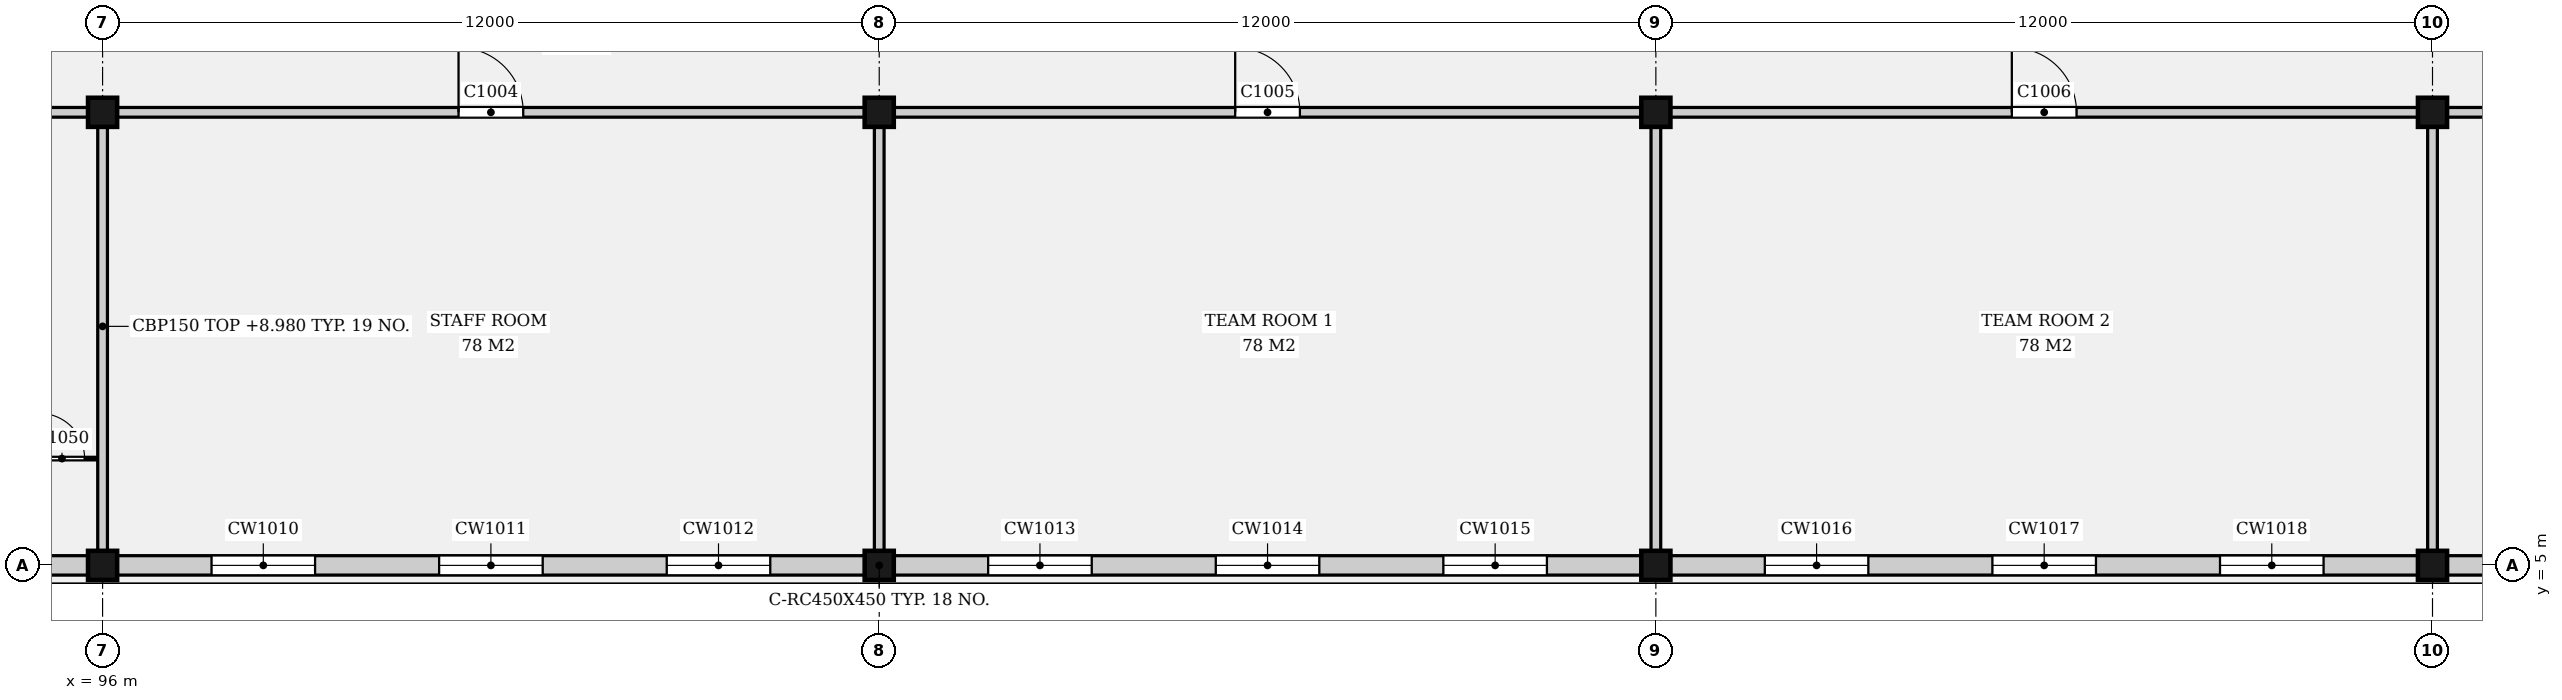
"""IFC4 building model, lengths in metres.
Left out: names, types, materials, properties, quantities, classifications, styles, units other than length and angle.
Written with IfcOpenShell. Run it as: python <this file> out.ifc"""

import sys

from ifc_helpers import new_model, si_unit, direction, frame, frame_2d, origin, origin_2d, place, context, subcontext, project, spatial, rectangle, extrude, element, fill, save


model = new_model("IFC4")
c1 = context("Model", 3, precision=1e-05, world=origin(), true_north=direction((0.0, 1.0)))
c2 = subcontext(c1, "Body", "Model", "MODEL_VIEW")
j1 = project(units=[si_unit("LENGTHUNIT", "METRE"), si_unit("PLANEANGLEUNIT", "RADIAN")], contexts=[c1])
p1 = place(None, origin())
s1 = spatial("IfcSite", under=j1, at=p1, CompositionType="ELEMENT")
p2 = place(p1, origin())
s2 = spatial("IfcBuilding", under=s1, at=p2, CompositionType="ELEMENT")
p3 = place(p2, frame((0.0, 0.0, 5.0)))
s3 = spatial("IfcBuildingStorey", under=s2, at=p3, CompositionType="ELEMENT", Elevation=5.0)
for number, where, z_axis, x_axis in (
    (1, (96.0, 5.0, 0.0), (0.0, 0.0, 1.0), (1.0, 0.0, 0.0)),
    (2, (96.0, 12.0, 0.0), (0.0, 0.0, 1.0), (1.0, 0.0, 0.0)),
    (3, (108.0, 5.0, 0.0), (0.0, 0.0, 1.0), (1.0, 0.0, 0.0)),
    (4, (108.0, 12.0, 0.0), (0.0, 0.0, 1.0), (1.0, 0.0, 0.0)),
    (5, (120.0, 5.0, 0.0), (0.0, 0.0, 1.0), (1.0, 0.0, 0.0)),
    (6, (120.0, 12.0, 0.0), (0.0, 0.0, 1.0), (1.0, 0.0, 0.0)),
    (7, (132.0, 5.0, 0.0), (0.0, 0.0, 1.0), (1.0, 0.0, 0.0)),
    (8, (132.0, 12.0, 0.0), (0.0, 0.0, 1.0), (1.0, 0.0, 0.0)),
):
    element("IfcColumn", number, at=place(p3, frame(where, z_axis=z_axis, x_axis=x_axis)), inside=s3, PredefinedType="COLUMN", context=c2, shape_type="SweptSolid", body=[
        extrude(rectangle(XDim=0.45, YDim=0.45, at=origin_2d()), origin(), (0.0, 0.0, 1.0), 4.4),
    ])
p4 = place(p3, frame((84.225, 5.0, 0.0), z_axis=(0.0, 0.0, 1.0), x_axis=(1.0, 0.0, 0.0)))
e9 = element("IfcWall", 9, at=p4, inside=s3, PredefinedType="ELEMENTEDWALL", context=c2, shape_type="SweptSolid", body=[
    extrude(rectangle(XDim=11.55, YDim=0.3, at=frame_2d((5.775, 0.0))), origin(), (0.0, 0.0, 1.0), 3.98),
])
p5 = place(p4, frame((1.458, 0.0, 1.4)))
e10 = element("IfcOpeningElement", 10, at=p5, cuts=e9, PredefinedType="OPENING", context=c2, shape_type="SweptSolid", body=[
    extrude(rectangle(XDim=1.6, YDim=1.2, at=frame_2d((0.8, 0.6))), frame((0.0, 0.16, 0.0), z_axis=(0.0, -1.0, 0.0), x_axis=(1.0, 0.0, 0.0)), (0.0, 0.0, 1.0), 0.32),
])
p6 = place(p4, frame((4.975, 0.0, 1.4)))
e11 = element("IfcOpeningElement", 11, at=p6, cuts=e9, PredefinedType="OPENING", context=c2, shape_type="SweptSolid", body=[
    extrude(rectangle(XDim=1.6, YDim=1.2, at=frame_2d((0.8, 0.6))), frame((0.0, 0.16, 0.0), z_axis=(0.0, -1.0, 0.0), x_axis=(1.0, 0.0, 0.0)), (0.0, 0.0, 1.0), 0.32),
])
p7 = place(p4, frame((8.492, 0.0, 1.4)))
e12 = element("IfcOpeningElement", 12, at=p7, cuts=e9, PredefinedType="OPENING", context=c2, shape_type="SweptSolid", body=[
    extrude(rectangle(XDim=1.6, YDim=1.2, at=frame_2d((0.8, 0.6))), frame((0.0, 0.16, 0.0), z_axis=(0.0, -1.0, 0.0), x_axis=(1.0, 0.0, 0.0)), (0.0, 0.0, 1.0), 0.32),
])
p8 = place(p3, frame((96.225, 5.0, 0.0), z_axis=(0.0, 0.0, 1.0), x_axis=(1.0, 0.0, 0.0)))
e13 = element("IfcWall", 13, at=p8, inside=s3, PredefinedType="ELEMENTEDWALL", context=c2, shape_type="SweptSolid", body=[
    extrude(rectangle(XDim=11.55, YDim=0.3, at=frame_2d((5.775, 0.0))), origin(), (0.0, 0.0, 1.0), 3.98),
])
p9 = place(p8, frame((1.458, 0.0, 1.4)))
e14 = element("IfcOpeningElement", 14, at=p9, cuts=e13, PredefinedType="OPENING", context=c2, shape_type="SweptSolid", body=[
    extrude(rectangle(XDim=1.6, YDim=1.2, at=frame_2d((0.8, 0.6))), frame((0.0, 0.16, 0.0), z_axis=(0.0, -1.0, 0.0), x_axis=(1.0, 0.0, 0.0)), (0.0, 0.0, 1.0), 0.32),
])
p10 = place(p8, frame((4.975, 0.0, 1.4)))
e15 = element("IfcOpeningElement", 15, at=p10, cuts=e13, PredefinedType="OPENING", context=c2, shape_type="SweptSolid", body=[
    extrude(rectangle(XDim=1.6, YDim=1.2, at=frame_2d((0.8, 0.6))), frame((0.0, 0.16, 0.0), z_axis=(0.0, -1.0, 0.0), x_axis=(1.0, 0.0, 0.0)), (0.0, 0.0, 1.0), 0.32),
])
p11 = place(p8, frame((8.492, 0.0, 1.4)))
e16 = element("IfcOpeningElement", 16, at=p11, cuts=e13, PredefinedType="OPENING", context=c2, shape_type="SweptSolid", body=[
    extrude(rectangle(XDim=1.6, YDim=1.2, at=frame_2d((0.8, 0.6))), frame((0.0, 0.16, 0.0), z_axis=(0.0, -1.0, 0.0), x_axis=(1.0, 0.0, 0.0)), (0.0, 0.0, 1.0), 0.32),
])
p12 = place(p3, frame((108.225, 5.0, 0.0), z_axis=(0.0, 0.0, 1.0), x_axis=(1.0, 0.0, 0.0)))
e17 = element("IfcWall", 17, at=p12, inside=s3, PredefinedType="ELEMENTEDWALL", context=c2, shape_type="SweptSolid", body=[
    extrude(rectangle(XDim=11.55, YDim=0.3, at=frame_2d((5.775, 0.0))), origin(), (0.0, 0.0, 1.0), 3.98),
])
p13 = place(p12, frame((1.458, 0.0, 1.4)))
e18 = element("IfcOpeningElement", 18, at=p13, cuts=e17, PredefinedType="OPENING", context=c2, shape_type="SweptSolid", body=[
    extrude(rectangle(XDim=1.6, YDim=1.2, at=frame_2d((0.8, 0.6))), frame((0.0, 0.16, 0.0), z_axis=(0.0, -1.0, 0.0), x_axis=(1.0, 0.0, 0.0)), (0.0, 0.0, 1.0), 0.32),
])
p14 = place(p12, frame((4.975, 0.0, 1.4)))
e19 = element("IfcOpeningElement", 19, at=p14, cuts=e17, PredefinedType="OPENING", context=c2, shape_type="SweptSolid", body=[
    extrude(rectangle(XDim=1.6, YDim=1.2, at=frame_2d((0.8, 0.6))), frame((0.0, 0.16, 0.0), z_axis=(0.0, -1.0, 0.0), x_axis=(1.0, 0.0, 0.0)), (0.0, 0.0, 1.0), 0.32),
])
p15 = place(p12, frame((8.492, 0.0, 1.4)))
e20 = element("IfcOpeningElement", 20, at=p15, cuts=e17, PredefinedType="OPENING", context=c2, shape_type="SweptSolid", body=[
    extrude(rectangle(XDim=1.6, YDim=1.2, at=frame_2d((0.8, 0.6))), frame((0.0, 0.16, 0.0), z_axis=(0.0, -1.0, 0.0), x_axis=(1.0, 0.0, 0.0)), (0.0, 0.0, 1.0), 0.32),
])
p16 = place(p3, frame((120.225, 5.0, 0.0), z_axis=(0.0, 0.0, 1.0), x_axis=(1.0, 0.0, 0.0)))
e21 = element("IfcWall", 21, at=p16, inside=s3, PredefinedType="ELEMENTEDWALL", context=c2, shape_type="SweptSolid", body=[
    extrude(rectangle(XDim=11.55, YDim=0.3, at=frame_2d((5.775, 0.0))), origin(), (0.0, 0.0, 1.0), 3.98),
])
p17 = place(p16, frame((1.458, 0.0, 1.4)))
e22 = element("IfcOpeningElement", 22, at=p17, cuts=e21, PredefinedType="OPENING", context=c2, shape_type="SweptSolid", body=[
    extrude(rectangle(XDim=1.6, YDim=1.2, at=frame_2d((0.8, 0.6))), frame((0.0, 0.16, 0.0), z_axis=(0.0, -1.0, 0.0), x_axis=(1.0, 0.0, 0.0)), (0.0, 0.0, 1.0), 0.32),
])
p18 = place(p16, frame((4.975, 0.0, 1.4)))
e23 = element("IfcOpeningElement", 23, at=p18, cuts=e21, PredefinedType="OPENING", context=c2, shape_type="SweptSolid", body=[
    extrude(rectangle(XDim=1.6, YDim=1.2, at=frame_2d((0.8, 0.6))), frame((0.0, 0.16, 0.0), z_axis=(0.0, -1.0, 0.0), x_axis=(1.0, 0.0, 0.0)), (0.0, 0.0, 1.0), 0.32),
])
p19 = place(p16, frame((8.492, 0.0, 1.4)))
e24 = element("IfcOpeningElement", 24, at=p19, cuts=e21, PredefinedType="OPENING", context=c2, shape_type="SweptSolid", body=[
    extrude(rectangle(XDim=1.6, YDim=1.2, at=frame_2d((0.8, 0.6))), frame((0.0, 0.16, 0.0), z_axis=(0.0, -1.0, 0.0), x_axis=(1.0, 0.0, 0.0)), (0.0, 0.0, 1.0), 0.32),
])
p20 = place(p3, frame((132.225, 5.0, 0.0), z_axis=(0.0, 0.0, 1.0), x_axis=(1.0, 0.0, 0.0)))
e25 = element("IfcWall", 25, at=p20, inside=s3, PredefinedType="ELEMENTEDWALL", context=c2, shape_type="SweptSolid", body=[
    extrude(rectangle(XDim=11.55, YDim=0.3, at=frame_2d((5.775, 0.0))), origin(), (0.0, 0.0, 1.0), 3.98),
])
p21 = place(p20, frame((1.458, 0.0, 1.4)))
e26 = element("IfcOpeningElement", 26, at=p21, cuts=e25, PredefinedType="OPENING", context=c2, shape_type="SweptSolid", body=[
    extrude(rectangle(XDim=1.6, YDim=1.2, at=frame_2d((0.8, 0.6))), frame((0.0, 0.16, 0.0), z_axis=(0.0, -1.0, 0.0), x_axis=(1.0, 0.0, 0.0)), (0.0, 0.0, 1.0), 0.32),
])
p22 = place(p20, frame((4.975, 0.0, 1.4)))
e27 = element("IfcOpeningElement", 27, at=p22, cuts=e25, PredefinedType="OPENING", context=c2, shape_type="SweptSolid", body=[
    extrude(rectangle(XDim=1.6, YDim=1.2, at=frame_2d((0.8, 0.6))), frame((0.0, 0.16, 0.0), z_axis=(0.0, -1.0, 0.0), x_axis=(1.0, 0.0, 0.0)), (0.0, 0.0, 1.0), 0.32),
])
p23 = place(p20, frame((8.492, 0.0, 1.4)))
e28 = element("IfcOpeningElement", 28, at=p23, cuts=e25, PredefinedType="OPENING", context=c2, shape_type="SweptSolid", body=[
    extrude(rectangle(XDim=1.6, YDim=1.2, at=frame_2d((0.8, 0.6))), frame((0.0, 0.16, 0.0), z_axis=(0.0, -1.0, 0.0), x_axis=(1.0, 0.0, 0.0)), (0.0, 0.0, 1.0), 0.32),
])
p24 = place(p3, frame((84.225, 12.0, 0.0), z_axis=(0.0, 0.0, 1.0), x_axis=(1.0, 0.0, 0.0)))
e29 = element("IfcWall", 29, at=p24, inside=s3, PredefinedType="PARTITIONING", context=c2, shape_type="SweptSolid", body=[
    extrude(rectangle(XDim=11.55, YDim=0.15, at=frame_2d((5.775, 0.0))), origin(), (0.0, 0.0, 1.0), 3.98),
])
p25 = place(p24, frame((4.875, 0.0, 0.0)))
e30 = element("IfcOpeningElement", 30, at=p25, cuts=e29, PredefinedType="OPENING", context=c2, shape_type="SweptSolid", body=[
    extrude(rectangle(XDim=1.8, YDim=2.4, at=frame_2d((0.9, 1.2))), frame((0.0, 0.085, 0.0), z_axis=(0.0, -1.0, 0.0), x_axis=(1.0, 0.0, 0.0)), (0.0, 0.0, 1.0), 0.17),
])
p26 = place(p3, frame((96.225, 12.0, 0.0), z_axis=(0.0, 0.0, 1.0), x_axis=(1.0, 0.0, 0.0)))
e31 = element("IfcWall", 31, at=p26, inside=s3, PredefinedType="PARTITIONING", context=c2, shape_type="SweptSolid", body=[
    extrude(rectangle(XDim=11.55, YDim=0.15, at=frame_2d((5.775, 0.0))), origin(), (0.0, 0.0, 1.0), 3.98),
])
p27 = place(p26, frame((5.275, 0.0, 0.0)))
e32 = element("IfcOpeningElement", 32, at=p27, cuts=e31, PredefinedType="OPENING", context=c2, shape_type="SweptSolid", body=[
    extrude(rectangle(XDim=1.0, YDim=2.1, at=frame_2d((0.5, 1.05))), frame((0.0, 0.085, 0.0), z_axis=(0.0, -1.0, 0.0), x_axis=(1.0, 0.0, 0.0)), (0.0, 0.0, 1.0), 0.17),
])
p28 = place(p3, frame((108.225, 12.0, 0.0), z_axis=(0.0, 0.0, 1.0), x_axis=(1.0, 0.0, 0.0)))
e33 = element("IfcWall", 33, at=p28, inside=s3, PredefinedType="PARTITIONING", context=c2, shape_type="SweptSolid", body=[
    extrude(rectangle(XDim=11.55, YDim=0.15, at=frame_2d((5.775, 0.0))), origin(), (0.0, 0.0, 1.0), 3.98),
])
p29 = place(p28, frame((5.275, 0.0, 0.0)))
e34 = element("IfcOpeningElement", 34, at=p29, cuts=e33, PredefinedType="OPENING", context=c2, shape_type="SweptSolid", body=[
    extrude(rectangle(XDim=1.0, YDim=2.1, at=frame_2d((0.5, 1.05))), frame((0.0, 0.085, 0.0), z_axis=(0.0, -1.0, 0.0), x_axis=(1.0, 0.0, 0.0)), (0.0, 0.0, 1.0), 0.17),
])
p30 = place(p3, frame((120.225, 12.0, 0.0), z_axis=(0.0, 0.0, 1.0), x_axis=(1.0, 0.0, 0.0)))
e35 = element("IfcWall", 35, at=p30, inside=s3, PredefinedType="PARTITIONING", context=c2, shape_type="SweptSolid", body=[
    extrude(rectangle(XDim=11.55, YDim=0.15, at=frame_2d((5.775, 0.0))), origin(), (0.0, 0.0, 1.0), 3.98),
])
p31 = place(p30, frame((5.275, 0.0, 0.0)))
e36 = element("IfcOpeningElement", 36, at=p31, cuts=e35, PredefinedType="OPENING", context=c2, shape_type="SweptSolid", body=[
    extrude(rectangle(XDim=1.0, YDim=2.1, at=frame_2d((0.5, 1.05))), frame((0.0, 0.085, 0.0), z_axis=(0.0, -1.0, 0.0), x_axis=(1.0, 0.0, 0.0)), (0.0, 0.0, 1.0), 0.17),
])
p32 = place(p3, frame((132.225, 12.0, 0.0), z_axis=(0.0, 0.0, 1.0), x_axis=(1.0, 0.0, 0.0)))
e37 = element("IfcWall", 37, at=p32, inside=s3, PredefinedType="PARTITIONING", context=c2, shape_type="SweptSolid", body=[
    extrude(rectangle(XDim=11.55, YDim=0.15, at=frame_2d((5.775, 0.0))), origin(), (0.0, 0.0, 1.0), 3.98),
])
p33 = place(p32, frame((5.275, 0.0, 0.0)))
e38 = element("IfcOpeningElement", 38, at=p33, cuts=e37, PredefinedType="OPENING", context=c2, shape_type="SweptSolid", body=[
    extrude(rectangle(XDim=1.0, YDim=2.1, at=frame_2d((0.5, 1.05))), frame((0.0, 0.085, 0.0), z_axis=(0.0, -1.0, 0.0), x_axis=(1.0, 0.0, 0.0)), (0.0, 0.0, 1.0), 0.17),
])
for number, where, z_axis, x_axis in (
    (39, (96.0, 5.225, 0.0), (0.0, 0.0, 1.0), (0.0, 1.0, 0.0)),
    (40, (108.0, 5.225, 0.0), (0.0, 0.0, 1.0), (0.0, 1.0, 0.0)),
    (41, (120.0, 5.225, 0.0), (0.0, 0.0, 1.0), (0.0, 1.0, 0.0)),
    (42, (132.0, 5.225, 0.0), (0.0, 0.0, 1.0), (0.0, 1.0, 0.0)),
):
    element("IfcWall", number, at=place(p3, frame(where, z_axis=z_axis, x_axis=x_axis)), inside=s3, PredefinedType="PARTITIONING", context=c2, shape_type="SweptSolid", body=[
        extrude(rectangle(XDim=6.55, YDim=0.15, at=frame_2d((3.275, 0.0))), origin(), (0.0, 0.0, 1.0), 3.98),
    ])
p34 = place(p3, frame((94.82, 6.65, 0.0), z_axis=(0.0, 0.0, 1.0), x_axis=(1.0, 0.0, 0.0)))
e43 = element("IfcWall", 43, at=p34, inside=s3, PredefinedType="PARTITIONING", context=c2, shape_type="SweptSolid", body=[
    extrude(rectangle(XDim=1.105, YDim=0.04, at=frame_2d((0.552, 0.0))), origin(), (0.0, 0.0, 1.0), 2.4),
])
p35 = place(p34, frame((0.202, 0.0, 0.0)))
e44 = element("IfcOpeningElement", 44, at=p35, cuts=e43, PredefinedType="OPENING", context=c2, shape_type="SweptSolid", body=[
    extrude(rectangle(XDim=0.7, YDim=2.0, at=frame_2d((0.35, 1.0))), frame((0.0, 0.03, 0.0), z_axis=(0.0, -1.0, 0.0), x_axis=(1.0, 0.0, 0.0)), (0.0, 0.0, 1.0), 0.06),
])
p36 = place(p9, origin())
e45 = element("IfcWindow", 45, at=p36, inside=s3, PartitioningType="SINGLE_PANEL", PredefinedType="WINDOW", context=c2, shape_type="SweptSolid", body=[
    extrude(rectangle(XDim=1.6, YDim=1.2, at=frame_2d((0.8, 0.6))), frame((0.0, 0.03, 0.0), z_axis=(0.0, -1.0, 0.0), x_axis=(1.0, 0.0, 0.0)), (0.0, 0.0, 1.0), 0.06),
])
fill(e14, e45)
p37 = place(p10, origin())
e46 = element("IfcWindow", 46, at=p37, inside=s3, PartitioningType="SINGLE_PANEL", PredefinedType="WINDOW", context=c2, shape_type="SweptSolid", body=[
    extrude(rectangle(XDim=1.6, YDim=1.2, at=frame_2d((0.8, 0.6))), frame((0.0, 0.03, 0.0), z_axis=(0.0, -1.0, 0.0), x_axis=(1.0, 0.0, 0.0)), (0.0, 0.0, 1.0), 0.06),
])
fill(e15, e46)
p38 = place(p11, origin())
e47 = element("IfcWindow", 47, at=p38, inside=s3, PartitioningType="SINGLE_PANEL", PredefinedType="WINDOW", context=c2, shape_type="SweptSolid", body=[
    extrude(rectangle(XDim=1.6, YDim=1.2, at=frame_2d((0.8, 0.6))), frame((0.0, 0.03, 0.0), z_axis=(0.0, -1.0, 0.0), x_axis=(1.0, 0.0, 0.0)), (0.0, 0.0, 1.0), 0.06),
])
fill(e16, e47)
p39 = place(p13, origin())
e48 = element("IfcWindow", 48, at=p39, inside=s3, PartitioningType="SINGLE_PANEL", PredefinedType="WINDOW", context=c2, shape_type="SweptSolid", body=[
    extrude(rectangle(XDim=1.6, YDim=1.2, at=frame_2d((0.8, 0.6))), frame((0.0, 0.03, 0.0), z_axis=(0.0, -1.0, 0.0), x_axis=(1.0, 0.0, 0.0)), (0.0, 0.0, 1.0), 0.06),
])
fill(e18, e48)
p40 = place(p14, origin())
e49 = element("IfcWindow", 49, at=p40, inside=s3, PartitioningType="SINGLE_PANEL", PredefinedType="WINDOW", context=c2, shape_type="SweptSolid", body=[
    extrude(rectangle(XDim=1.6, YDim=1.2, at=frame_2d((0.8, 0.6))), frame((0.0, 0.03, 0.0), z_axis=(0.0, -1.0, 0.0), x_axis=(1.0, 0.0, 0.0)), (0.0, 0.0, 1.0), 0.06),
])
fill(e19, e49)
p41 = place(p15, origin())
e50 = element("IfcWindow", 50, at=p41, inside=s3, PartitioningType="SINGLE_PANEL", PredefinedType="WINDOW", context=c2, shape_type="SweptSolid", body=[
    extrude(rectangle(XDim=1.6, YDim=1.2, at=frame_2d((0.8, 0.6))), frame((0.0, 0.03, 0.0), z_axis=(0.0, -1.0, 0.0), x_axis=(1.0, 0.0, 0.0)), (0.0, 0.0, 1.0), 0.06),
])
fill(e20, e50)
p42 = place(p17, origin())
e51 = element("IfcWindow", 51, at=p42, inside=s3, PartitioningType="SINGLE_PANEL", PredefinedType="WINDOW", context=c2, shape_type="SweptSolid", body=[
    extrude(rectangle(XDim=1.6, YDim=1.2, at=frame_2d((0.8, 0.6))), frame((0.0, 0.03, 0.0), z_axis=(0.0, -1.0, 0.0), x_axis=(1.0, 0.0, 0.0)), (0.0, 0.0, 1.0), 0.06),
])
fill(e22, e51)
p43 = place(p18, origin())
e52 = element("IfcWindow", 52, at=p43, inside=s3, PartitioningType="SINGLE_PANEL", PredefinedType="WINDOW", context=c2, shape_type="SweptSolid", body=[
    extrude(rectangle(XDim=1.6, YDim=1.2, at=frame_2d((0.8, 0.6))), frame((0.0, 0.03, 0.0), z_axis=(0.0, -1.0, 0.0), x_axis=(1.0, 0.0, 0.0)), (0.0, 0.0, 1.0), 0.06),
])
fill(e23, e52)
p44 = place(p19, origin())
e53 = element("IfcWindow", 53, at=p44, inside=s3, PartitioningType="SINGLE_PANEL", PredefinedType="WINDOW", context=c2, shape_type="SweptSolid", body=[
    extrude(rectangle(XDim=1.6, YDim=1.2, at=frame_2d((0.8, 0.6))), frame((0.0, 0.03, 0.0), z_axis=(0.0, -1.0, 0.0), x_axis=(1.0, 0.0, 0.0)), (0.0, 0.0, 1.0), 0.06),
])
fill(e24, e53)
p45 = place(p27, origin())
e54 = element("IfcDoor", 54, at=p45, inside=s3, OperationType="SINGLE_SWING_LEFT", PredefinedType="DOOR", context=c2, shape_type="SweptSolid", body=[
    extrude(rectangle(XDim=1.0, YDim=2.1, at=frame_2d((0.5, 1.05))), frame((0.0, 0.025, 0.0), z_axis=(0.0, -1.0, 0.0), x_axis=(1.0, 0.0, 0.0)), (0.0, 0.0, 1.0), 0.05),
])
fill(e32, e54)
p46 = place(p29, origin())
e55 = element("IfcDoor", 55, at=p46, inside=s3, OperationType="SINGLE_SWING_LEFT", PredefinedType="DOOR", context=c2, shape_type="SweptSolid", body=[
    extrude(rectangle(XDim=1.0, YDim=2.1, at=frame_2d((0.5, 1.05))), frame((0.0, 0.025, 0.0), z_axis=(0.0, -1.0, 0.0), x_axis=(1.0, 0.0, 0.0)), (0.0, 0.0, 1.0), 0.05),
])
fill(e34, e55)
p47 = place(p31, origin())
e56 = element("IfcDoor", 56, at=p47, inside=s3, OperationType="SINGLE_SWING_LEFT", PredefinedType="DOOR", context=c2, shape_type="SweptSolid", body=[
    extrude(rectangle(XDim=1.0, YDim=2.1, at=frame_2d((0.5, 1.05))), frame((0.0, 0.025, 0.0), z_axis=(0.0, -1.0, 0.0), x_axis=(1.0, 0.0, 0.0)), (0.0, 0.0, 1.0), 0.05),
])
fill(e36, e56)
p48 = place(p35, origin())
e57 = element("IfcDoor", 57, at=p48, inside=s3, OperationType="SINGLE_SWING_LEFT", PredefinedType="DOOR", context=c2, shape_type="SweptSolid", body=[
    extrude(rectangle(XDim=0.7, YDim=2.0, at=frame_2d((0.35, 1.0))), frame((0.0, 0.02, 0.0), z_axis=(0.0, -1.0, 0.0), x_axis=(1.0, 0.0, 0.0)), (0.0, 0.0, 1.0), 0.04),
])
fill(e44, e57)
save(model, sys.argv[1])
